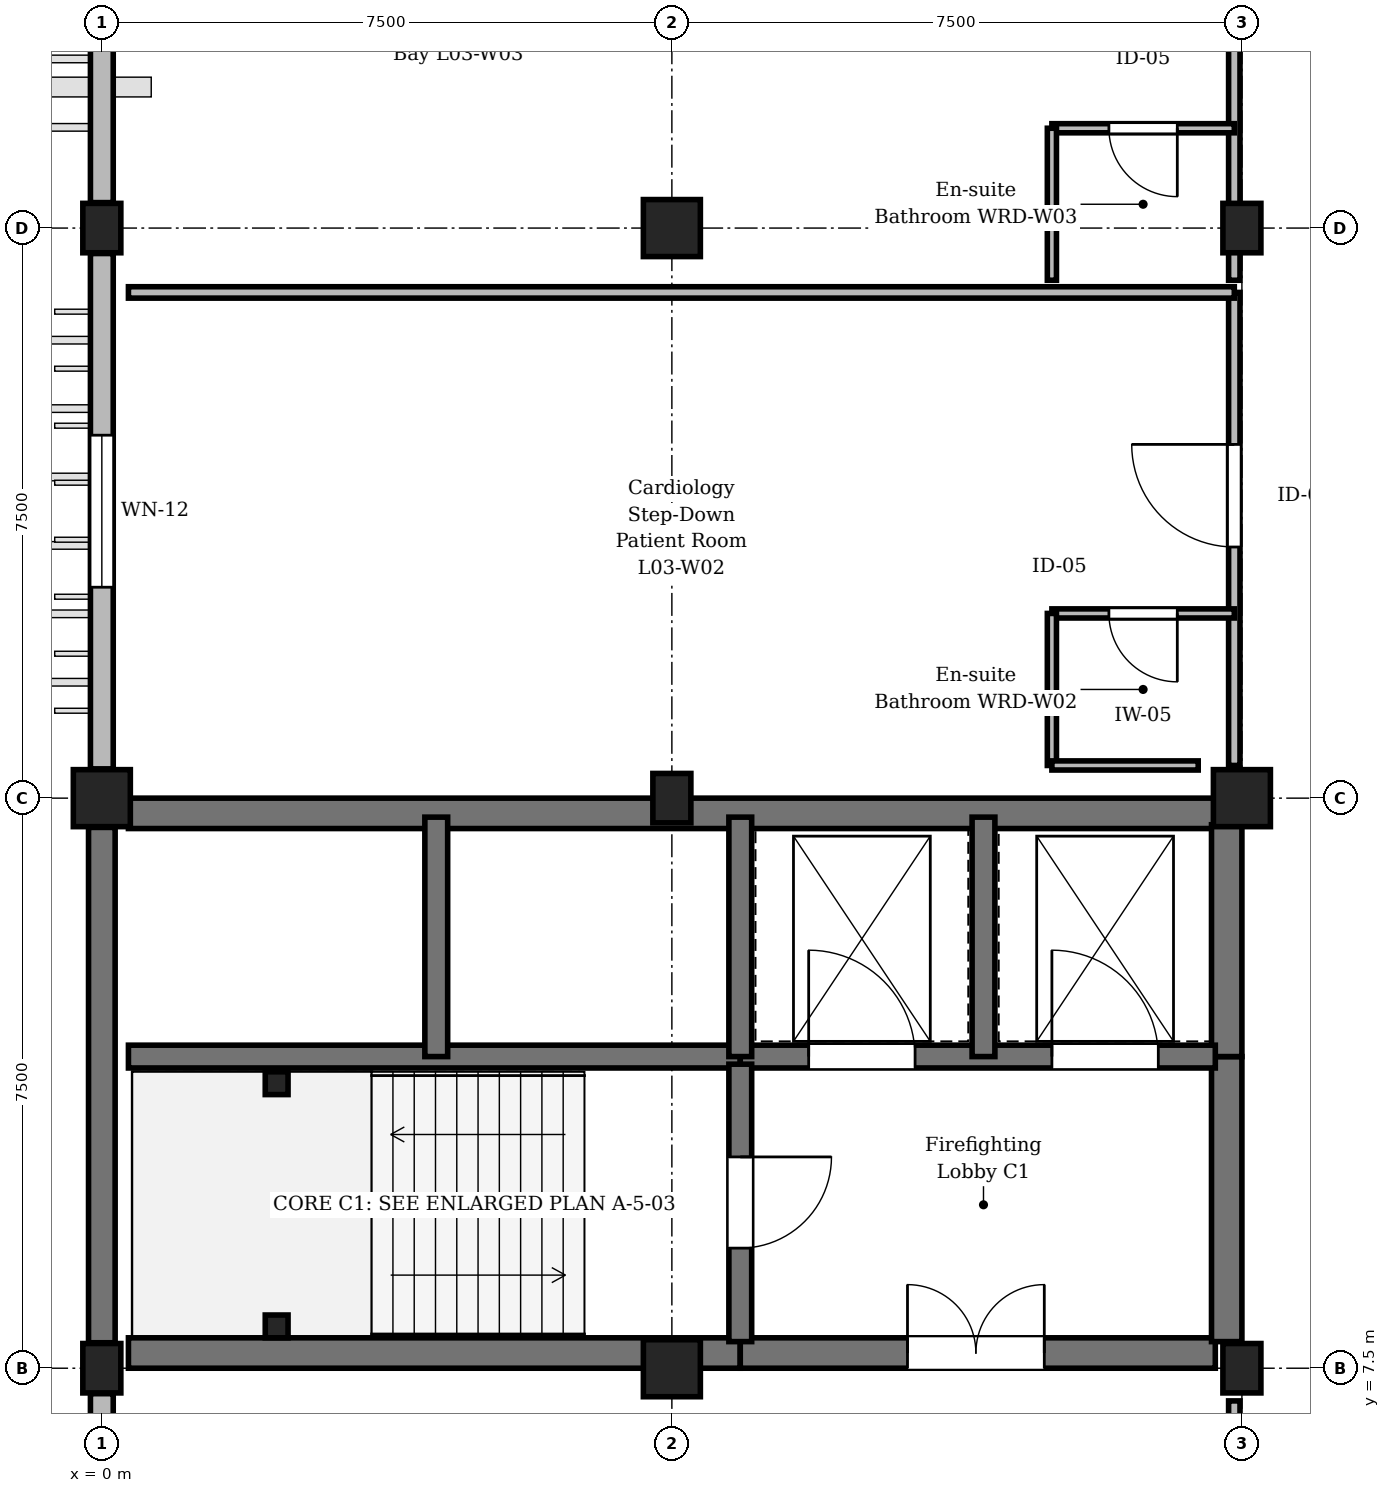
"""IFC4 building model, lengths in metres.
Left out: names, types, materials, properties, quantities, classifications, styles, units other than length and angle.
Written with IfcOpenShell. Run it as: python <this file> out.ifc"""

import sys

from ifc_helpers import new_model, si_unit, direction, frame, frame_2d, origin, origin_2d, place, context, subcontext, project, spatial, rectangle, i_section, extrude, element, fill, save


model = new_model("IFC4")
c1 = context("Model", 3, precision=1e-05, world=origin(), true_north=direction((0.0, 1.0)))
c2 = subcontext(c1, "Body", "Model", "MODEL_VIEW")
j1 = project(units=[si_unit("LENGTHUNIT", "METRE"), si_unit("PLANEANGLEUNIT", "RADIAN")], contexts=[c1])
p1 = place(None, origin())
s1 = spatial("IfcSite", under=j1, at=p1, CompositionType="ELEMENT")
p2 = place(p1, origin())
s2 = spatial("IfcBuilding", under=s1, at=p2, CompositionType="ELEMENT")
p3 = place(p2, frame((0.0, 0.0, 14.1)))
s3 = spatial("IfcBuildingStorey", under=s2, at=p3, CompositionType="ELEMENT", Elevation=14.1)
p4 = place(p3, frame((0.0, 7.5, 0.0), z_axis=(0.0, 0.0, 1.0), x_axis=(1.0, 0.0, 0.0)))
e1 = element("IfcColumn", 1, at=p4, inside=s3, PredefinedType="COLUMN", context=c2, shape_type="SweptSolid", body=[
    extrude(rectangle(XDim=0.5, YDim=0.65, at=origin_2d()), origin(), (0.0, 0.0, 1.0), 3.75),
])
p5 = place(p3, frame((0.0, 15.0, 0.0), z_axis=(0.0, 0.0, 1.0), x_axis=(1.0, 0.0, 0.0)))
e2 = element("IfcColumn", 2, at=p5, inside=s3, PredefinedType="COLUMN", context=c2, shape_type="SweptSolid", body=[
    extrude(rectangle(XDim=0.75, YDim=0.75, at=origin_2d()), origin(), (0.0, 0.0, 1.0), 3.75),
])
p6 = place(p3, frame((0.0, 22.5, 0.0), z_axis=(0.0, 0.0, 1.0), x_axis=(1.0, 0.0, 0.0)))
e3 = element("IfcColumn", 3, at=p6, inside=s3, PredefinedType="COLUMN", context=c2, shape_type="SweptSolid", body=[
    extrude(rectangle(XDim=0.5, YDim=0.65, at=origin_2d()), origin(), (0.0, 0.0, 1.0), 3.75),
])
p7 = place(p3, frame((7.5, 7.5, 0.0), z_axis=(0.0, 0.0, 1.0), x_axis=(1.0, 0.0, 0.0)))
e4 = element("IfcColumn", 4, at=p7, inside=s3, PredefinedType="COLUMN", context=c2, shape_type="SweptSolid", body=[
    extrude(rectangle(XDim=0.75, YDim=0.75, at=origin_2d()), origin(), (0.0, 0.0, 1.0), 3.75),
])
p8 = place(p3, frame((7.5, 15.0, 0.0), z_axis=(0.0, 0.0, 1.0), x_axis=(1.0, 0.0, 0.0)))
e5 = element("IfcColumn", 5, at=p8, inside=s3, PredefinedType="COLUMN", context=c2, shape_type="SweptSolid", body=[
    extrude(rectangle(XDim=0.5, YDim=0.65, at=origin_2d()), origin(), (0.0, 0.0, 1.0), 3.75),
])
p9 = place(p3, frame((7.5, 22.5, 0.0), z_axis=(0.0, 0.0, 1.0), x_axis=(1.0, 0.0, 0.0)))
e6 = element("IfcColumn", 6, at=p9, inside=s3, PredefinedType="COLUMN", context=c2, shape_type="SweptSolid", body=[
    extrude(rectangle(XDim=0.75, YDim=0.75, at=origin_2d()), origin(), (0.0, 0.0, 1.0), 3.75),
])
p10 = place(p3, frame((15.0, 7.5, 0.0), z_axis=(0.0, 0.0, 1.0), x_axis=(1.0, 0.0, 0.0)))
e7 = element("IfcColumn", 7, at=p10, inside=s3, PredefinedType="COLUMN", context=c2, shape_type="SweptSolid", body=[
    extrude(rectangle(XDim=0.5, YDim=0.65, at=origin_2d()), origin(), (0.0, 0.0, 1.0), 3.75),
])
p11 = place(p3, frame((15.0, 15.0, 0.0), z_axis=(0.0, 0.0, 1.0), x_axis=(1.0, 0.0, 0.0)))
e8 = element("IfcColumn", 8, at=p11, inside=s3, PredefinedType="COLUMN", context=c2, shape_type="SweptSolid", body=[
    extrude(rectangle(XDim=0.75, YDim=0.75, at=origin_2d()), origin(), (0.0, 0.0, 1.0), 3.75),
])
p12 = place(p3, frame((15.0, 22.5, 0.0), z_axis=(0.0, 0.0, 1.0), x_axis=(1.0, 0.0, 0.0)))
e9 = element("IfcColumn", 9, at=p12, inside=s3, PredefinedType="COLUMN", context=c2, shape_type="SweptSolid", body=[
    extrude(rectangle(XDim=0.5, YDim=0.65, at=origin_2d()), origin(), (0.0, 0.0, 1.0), 3.75),
])
for number, where, z_axis, x_axis in (
    (10, (2.3, 8.05, 0.0), (0.0, 0.0, 1.0), (1.0, 0.0, 0.0)),
    (11, (2.3, 11.25, 0.0), (0.0, 0.0, 1.0), (1.0, 0.0, 0.0)),
):
    element("IfcColumn", number, at=place(p3, frame(where, z_axis=z_axis, x_axis=x_axis)), inside=s3, PredefinedType="COLUMN", context=c2, shape_type="SweptSolid", body=[
        extrude(i_section(OverallWidth=0.3, OverallDepth=0.3, WebThickness=0.011, FlangeThickness=0.019, FilletRadius=0.027, at=origin_2d()), origin(), (0.0, 0.0, 1.0), 3.75),
    ])
p13 = place(p3, frame((0.0, 0.36, 0.0), z_axis=(0.0, 0.0, 1.0), x_axis=(0.0, 1.0, 0.0)))
e12 = element("IfcWall", 12, at=p13, inside=s3, PredefinedType="STANDARD", context=c2, shape_type="SweptSolid", body=[
    extrude(rectangle(XDim=6.805, YDim=0.3, at=frame_2d((3.402, 0.0))), origin(), (0.0, 0.0, 1.0), 2.87),
])
p14 = place(p13, frame((2.603, 0.0, 0.9)))
e13 = element("IfcOpeningElement", 13, at=p14, cuts=e12, PredefinedType="OPENING", context=c2, shape_type="SweptSolid", body=[
    extrude(rectangle(XDim=1.6, YDim=1.69, at=frame_2d((0.8, 0.845))), frame((0.0, 0.16, 0.0), z_axis=(0.0, -1.0, 0.0), x_axis=(1.0, 0.0, 0.0)), (0.0, 0.0, 1.0), 0.32),
])
p15 = place(p3, frame((0.0, 7.835, 0.0), z_axis=(0.0, 0.0, 1.0), x_axis=(0.0, 1.0, 0.0)))
e14 = element("IfcWall", 14, at=p15, inside=s3, PredefinedType="SHEAR", context=c2, shape_type="SweptSolid", body=[
    extrude(rectangle(XDim=6.78, YDim=0.35, at=frame_2d((3.39, 0.0))), origin(), (0.0, 0.0, 1.0), 3.47),
])
p16 = place(p3, frame((0.0, 15.385, 0.0), z_axis=(0.0, 0.0, 1.0), x_axis=(0.0, 1.0, 0.0)))
e15 = element("IfcWall", 15, at=p16, inside=s3, PredefinedType="STANDARD", context=c2, shape_type="SweptSolid", body=[
    extrude(rectangle(XDim=6.78, YDim=0.3, at=frame_2d((3.39, 0.0))), origin(), (0.0, 0.0, 1.0), 2.87),
])
p17 = place(p16, frame((2.39, 0.0, 0.9)))
e16 = element("IfcOpeningElement", 16, at=p17, cuts=e15, PredefinedType="OPENING", context=c2, shape_type="SweptSolid", body=[
    extrude(rectangle(XDim=2.0, YDim=1.69, at=frame_2d((1.0, 0.845))), frame((0.0, 0.16, 0.0), z_axis=(0.0, -1.0, 0.0), x_axis=(1.0, 0.0, 0.0)), (0.0, 0.0, 1.0), 0.32),
])
p18 = place(p3, frame((0.0, 22.835, 0.0), z_axis=(0.0, 0.0, 1.0), x_axis=(0.0, 1.0, 0.0)))
e17 = element("IfcWall", 17, at=p18, inside=s3, PredefinedType="STANDARD", context=c2, shape_type="SweptSolid", body=[
    extrude(rectangle(XDim=8.28, YDim=0.3, at=frame_2d((4.14, 0.0))), origin(), (0.0, 0.0, 1.0), 2.92),
])
p19 = place(p18, frame((3.04, 0.0, 0.9)))
e18 = element("IfcOpeningElement", 18, at=p19, cuts=e17, PredefinedType="OPENING", context=c2, shape_type="SweptSolid", body=[
    extrude(rectangle(XDim=2.2, YDim=1.74, at=frame_2d((1.1, 0.87))), frame((0.0, 0.16, 0.0), z_axis=(0.0, -1.0, 0.0), x_axis=(1.0, 0.0, 0.0)), (0.0, 0.0, 1.0), 0.32),
])
p20 = place(p3, frame((0.35, 7.7, 0.0), z_axis=(0.0, 0.0, 1.0), x_axis=(1.0, 0.0, 0.0)))
e19 = element("IfcWall", 19, at=p20, inside=s3, PredefinedType="SHEAR", context=c2, shape_type="SweptSolid", body=[
    extrude(rectangle(XDim=8.05, YDim=0.4, at=frame_2d((4.025, 0.0))), origin(), (0.0, 0.0, 1.0), 3.47),
])
p21 = place(p3, frame((8.4, 7.7, 0.0), z_axis=(0.0, 0.0, 1.0), x_axis=(1.0, 0.0, 0.0)))
e20 = element("IfcWall", 20, at=p21, inside=s3, PredefinedType="SHEAR", context=c2, shape_type="SweptSolid", body=[
    extrude(rectangle(XDim=6.25, YDim=0.4, at=frame_2d((3.125, 0.0))), origin(), (0.0, 0.0, 1.0), 3.47),
])
p22 = place(p21, frame((2.2, 0.0, 0.0)))
e21 = element("IfcOpeningElement", 21, at=p22, cuts=e20, PredefinedType="OPENING", context=c2, shape_type="SweptSolid", body=[
    extrude(rectangle(XDim=1.8, YDim=2.25, at=frame_2d((0.9, 1.125))), frame((0.0, 0.21, 0.0), z_axis=(0.0, -1.0, 0.0), x_axis=(1.0, 0.0, 0.0)), (0.0, 0.0, 1.0), 0.42),
])
p23 = place(p3, frame((0.35, 14.8, 0.0), z_axis=(0.0, 0.0, 1.0), x_axis=(1.0, 0.0, 0.0)))
e22 = element("IfcWall", 22, at=p23, inside=s3, PredefinedType="SHEAR", context=c2, shape_type="SweptSolid", body=[
    extrude(rectangle(XDim=14.3, YDim=0.4, at=frame_2d((7.15, 0.0))), origin(), (0.0, 0.0, 1.0), 3.47),
])
p24 = place(p3, frame((14.8, 7.85, 0.0), z_axis=(0.0, 0.0, 1.0), x_axis=(0.0, 1.0, 0.0)))
e23 = element("IfcWall", 23, at=p24, inside=s3, PredefinedType="SHEAR", context=c2, shape_type="SweptSolid", body=[
    extrude(rectangle(XDim=3.75, YDim=0.4, at=frame_2d((1.875, 0.0))), origin(), (0.0, 0.0, 1.0), 3.47),
])
p25 = place(p3, frame((14.8, 11.6, 0.0), z_axis=(0.0, 0.0, 1.0), x_axis=(0.0, 1.0, 0.0)))
e24 = element("IfcWall", 24, at=p25, inside=s3, PredefinedType="SHEAR", context=c2, shape_type="SweptSolid", body=[
    extrude(rectangle(XDim=3.05, YDim=0.4, at=frame_2d((1.525, 0.0))), origin(), (0.0, 0.0, 1.0), 3.47),
])
p26 = place(p3, frame((0.35, 11.6, 0.0), z_axis=(0.0, 0.0, 1.0), x_axis=(1.0, 0.0, 0.0)))
e25 = element("IfcWall", 25, at=p26, inside=s3, PredefinedType="SHEAR", context=c2, shape_type="SweptSolid", body=[
    extrude(rectangle(XDim=8.05, YDim=0.3, at=frame_2d((4.025, 0.0))), origin(), (0.0, 0.0, 1.0), 3.47),
])
p27 = place(p3, frame((8.4, 11.6, 0.0), z_axis=(0.0, 0.0, 1.0), x_axis=(1.0, 0.0, 0.0)))
e26 = element("IfcWall", 26, at=p27, inside=s3, PredefinedType="SHEAR", context=c2, shape_type="SweptSolid", body=[
    extrude(rectangle(XDim=6.25, YDim=0.3, at=frame_2d((3.125, 0.0))), origin(), (0.0, 0.0, 1.0), 3.47),
])
p28 = place(p27, frame((0.9, 0.0, 0.0)))
e27 = element("IfcOpeningElement", 27, at=p28, cuts=e26, PredefinedType="OPENING", context=c2, shape_type="SweptSolid", body=[
    extrude(rectangle(XDim=1.4, YDim=2.25, at=frame_2d((0.7, 1.125))), frame((0.0, 0.16, 0.0), z_axis=(0.0, -1.0, 0.0), x_axis=(1.0, 0.0, 0.0)), (0.0, 0.0, 1.0), 0.32),
])
p29 = place(p27, frame((4.1, 0.0, 0.0)))
e28 = element("IfcOpeningElement", 28, at=p29, cuts=e26, PredefinedType="OPENING", context=c2, shape_type="SweptSolid", body=[
    extrude(rectangle(XDim=1.4, YDim=2.25, at=frame_2d((0.7, 1.125))), frame((0.0, 0.16, 0.0), z_axis=(0.0, -1.0, 0.0), x_axis=(1.0, 0.0, 0.0)), (0.0, 0.0, 1.0), 0.32),
])
p30 = place(p3, frame((8.4, 11.5, 0.0), z_axis=(0.0, 0.0, 1.0), x_axis=(0.0, -1.0, 0.0)))
e29 = element("IfcWall", 29, at=p30, inside=s3, PredefinedType="SHEAR", context=c2, shape_type="SweptSolid", body=[
    extrude(rectangle(XDim=3.65, YDim=0.3, at=frame_2d((1.825, 0.0))), origin(), (0.0, 0.0, 1.0), 3.47),
])
p31 = place(p30, frame((1.22, 0.0, 0.0)))
e30 = element("IfcOpeningElement", 30, at=p31, cuts=e29, PredefinedType="OPENING", context=c2, shape_type="SweptSolid", body=[
    extrude(rectangle(XDim=1.2, YDim=2.25, at=frame_2d((0.6, 1.125))), frame((0.0, 0.16, 0.0), z_axis=(0.0, -1.0, 0.0), x_axis=(1.0, 0.0, 0.0)), (0.0, 0.0, 1.0), 0.32),
])
for number, where, z_axis, x_axis in (
    (31, (4.4, 11.6, 0.0), (0.0, 0.0, 1.0), (0.0, 1.0, 0.0)),
    (32, (8.4, 11.6, 0.0), (0.0, 0.0, 1.0), (0.0, 1.0, 0.0)),
    (33, (11.6, 11.6, 0.0), (0.0, 0.0, 1.0), (0.0, 1.0, 0.0)),
):
    element("IfcWall", number, at=place(p3, frame(where, z_axis=z_axis, x_axis=x_axis)), inside=s3, PredefinedType="SHEAR", context=c2, shape_type="SweptSolid", body=[
        extrude(rectangle(XDim=3.15, YDim=0.3, at=frame_2d((1.575, 0.0))), origin(), (0.0, 0.0, 1.0), 3.47),
    ])
p32 = place(p3, frame((14.9, 2.68, 0.0), z_axis=(0.0, 0.0, 1.0), x_axis=(0.0, 1.0, 0.0)))
e34 = element("IfcWall", 34, at=p32, inside=s3, PredefinedType="PARTITIONING", context=c2, shape_type="SweptSolid", body=[
    extrude(rectangle(XDim=4.39, YDim=0.15, at=frame_2d((2.195, 0.0))), origin(), (0.0, 0.0, 1.0), 2.905),
])
p33 = place(p32, frame((0.504, 0.0, 0.0)))
e35 = element("IfcOpeningElement", 35, at=p33, cuts=e34, PredefinedType="OPENING", context=c2, shape_type="SweptSolid", body=[
    extrude(rectangle(XDim=1.35, YDim=2.25, at=frame_2d((0.675, 1.125))), frame((0.0, 0.085, 0.0), z_axis=(0.0, -1.0, 0.0), x_axis=(1.0, 0.0, 0.0)), (0.0, 0.0, 1.0), 0.17),
])
p34 = place(p3, frame((14.9, 15.43, 0.0), z_axis=(0.0, 0.0, 1.0), x_axis=(0.0, 1.0, 0.0)))
e36 = element("IfcWall", 36, at=p34, inside=s3, PredefinedType="PARTITIONING", context=c2, shape_type="SweptSolid", body=[
    extrude(rectangle(XDim=6.223, YDim=0.15, at=frame_2d((3.112, 0.0))), origin(), (0.0, 0.0, 1.0), 2.905),
])
p35 = place(p34, frame((2.874, 0.0, 0.0)))
e37 = element("IfcOpeningElement", 37, at=p35, cuts=e36, PredefinedType="OPENING", context=c2, shape_type="SweptSolid", body=[
    extrude(rectangle(XDim=1.35, YDim=2.25, at=frame_2d((0.675, 1.125))), frame((0.0, 0.085, 0.0), z_axis=(0.0, -1.0, 0.0), x_axis=(1.0, 0.0, 0.0)), (0.0, 0.0, 1.0), 0.17),
])
p36 = place(p3, frame((14.9, 17.43, 0.0), z_axis=(0.0, 0.0, 1.0), x_axis=(-1.0, 0.0, 0.0)))
e38 = element("IfcWall", 38, at=p36, inside=s3, PredefinedType="PARTITIONING", context=c2, shape_type="SweptSolid", body=[
    extrude(rectangle(XDim=2.4, YDim=0.12, at=frame_2d((1.2, 0.0))), origin(), (0.0, 0.0, 1.0), 3.455),
])
p37 = place(p36, frame((0.75, 0.0, 0.0)))
e39 = element("IfcOpeningElement", 39, at=p37, cuts=e38, PredefinedType="OPENING", context=c2, shape_type="SweptSolid", body=[
    extrude(rectangle(XDim=0.9, YDim=2.1, at=frame_2d((0.45, 1.05))), frame((0.0, 0.07, 0.0), z_axis=(0.0, -1.0, 0.0), x_axis=(1.0, 0.0, 0.0)), (0.0, 0.0, 1.0), 0.14),
])
p38 = place(p3, frame((12.5, 15.43, 0.0), z_axis=(0.0, 0.0, 1.0), x_axis=(0.0, 1.0, 0.0)))
e40 = element("IfcWall", 40, at=p38, inside=s3, PredefinedType="PARTITIONING", context=c2, shape_type="SweptSolid", body=[
    extrude(rectangle(XDim=2.0, YDim=0.12, at=frame_2d((1.0, 0.0))), origin(), (0.0, 0.0, 1.0), 3.455),
])
p39 = place(p3, frame((14.9, 21.813, 0.0), z_axis=(0.0, 0.0, 1.0), x_axis=(0.0, 1.0, 0.0)))
e41 = element("IfcWall", 41, at=p39, inside=s3, PredefinedType="PARTITIONING", context=c2, shape_type="SweptSolid", body=[
    extrude(rectangle(XDim=6.223, YDim=0.15, at=frame_2d((3.112, 0.0))), origin(), (0.0, 0.0, 1.0), 2.755),
])
p40 = place(p39, frame((4.623, 0.0, 0.0)))
e42 = element("IfcOpeningElement", 42, at=p40, cuts=e41, PredefinedType="OPENING", context=c2, shape_type="SweptSolid", body=[
    extrude(rectangle(XDim=1.35, YDim=2.25, at=frame_2d((0.675, 1.125))), frame((0.0, 0.085, 0.0), z_axis=(0.0, -1.0, 0.0), x_axis=(1.0, 0.0, 0.0)), (0.0, 0.0, 1.0), 0.17),
])
p41 = place(p3, frame((14.9, 23.813, 0.0), z_axis=(0.0, 0.0, 1.0), x_axis=(-1.0, 0.0, 0.0)))
e43 = element("IfcWall", 43, at=p41, inside=s3, PredefinedType="PARTITIONING", context=c2, shape_type="SweptSolid", body=[
    extrude(rectangle(XDim=2.4, YDim=0.12, at=frame_2d((1.2, 0.0))), origin(), (0.0, 0.0, 1.0), 3.455),
])
p42 = place(p41, frame((0.75, 0.0, 0.0)))
e44 = element("IfcOpeningElement", 44, at=p42, cuts=e43, PredefinedType="OPENING", context=c2, shape_type="SweptSolid", body=[
    extrude(rectangle(XDim=0.9, YDim=2.1, at=frame_2d((0.45, 1.05))), frame((0.0, 0.07, 0.0), z_axis=(0.0, -1.0, 0.0), x_axis=(1.0, 0.0, 0.0)), (0.0, 0.0, 1.0), 0.14),
])
p43 = place(p3, frame((12.5, 21.813, 0.0), z_axis=(0.0, 0.0, 1.0), x_axis=(0.0, 1.0, 0.0)))
e45 = element("IfcWall", 45, at=p43, inside=s3, PredefinedType="PARTITIONING", context=c2, shape_type="SweptSolid", body=[
    extrude(rectangle(XDim=2.0, YDim=0.12, at=frame_2d((1.0, 0.0))), origin(), (0.0, 0.0, 1.0), 3.455),
])
p44 = place(p3, frame((0.35, 21.653, 0.0), z_axis=(0.0, 0.0, 1.0), x_axis=(1.0, 0.0, 0.0)))
e46 = element("IfcWall", 46, at=p44, inside=s3, PredefinedType="PARTITIONING", context=c2, shape_type="SweptSolid", body=[
    extrude(rectangle(XDim=14.55, YDim=0.15, at=frame_2d((7.275, 0.0))), origin(), (0.0, 0.0, 1.0), 3.455),
])
p45 = place(p3, frame((12.5, 15.43, 0.0), z_axis=(0.0, 0.0, 1.0), x_axis=(1.0, 0.0, 0.0)))
e47 = element("IfcWall", 47, at=p45, inside=s3, PredefinedType="PARTITIONING", context=c2, shape_type="SweptSolid", body=[
    extrude(rectangle(XDim=1.925, YDim=0.12, at=frame_2d((0.962, 0.0))), origin(), (0.0, 0.0, 1.0), 3.455),
])
p46 = place(p17, origin())
e48 = element("IfcWindow", 48, at=p46, inside=s3, PartitioningType="SINGLE_PANEL", PredefinedType="WINDOW", context=c2, shape_type="SweptSolid", body=[
    extrude(rectangle(XDim=2.0, YDim=1.69, at=frame_2d((1.0, 0.845))), frame((0.0, 0.03, 0.0), z_axis=(0.0, -1.0, 0.0), x_axis=(1.0, 0.0, 0.0)), (0.0, 0.0, 1.0), 0.06),
])
fill(e16, e48)
p47 = place(p22, origin())
e49 = element("IfcDoor", 49, at=p47, inside=s3, OperationType="DOUBLE_DOOR_SINGLE_SWING", PredefinedType="DOOR", context=c2, shape_type="SweptSolid", body=[
    extrude(rectangle(XDim=1.8, YDim=2.25, at=frame_2d((0.9, 1.125))), frame((0.0, 0.025, 0.0), z_axis=(0.0, -1.0, 0.0), x_axis=(1.0, 0.0, 0.0)), (0.0, 0.0, 1.0), 0.05),
])
fill(e21, e49)
p48 = place(p28, origin())
e50 = element("IfcDoor", 50, at=p48, inside=s3, OperationType="DOUBLE_DOOR_SLIDING", PredefinedType="DOOR", context=c2, shape_type="SweptSolid", body=[
    extrude(rectangle(XDim=1.4, YDim=2.25, at=frame_2d((0.7, 1.125))), frame((0.0, 0.025, 0.0), z_axis=(0.0, -1.0, 0.0), x_axis=(1.0, 0.0, 0.0)), (0.0, 0.0, 1.0), 0.05),
])
fill(e27, e50)
p49 = place(p29, origin())
e51 = element("IfcDoor", 51, at=p49, inside=s3, OperationType="DOUBLE_DOOR_SLIDING", PredefinedType="DOOR", context=c2, shape_type="SweptSolid", body=[
    extrude(rectangle(XDim=1.4, YDim=2.25, at=frame_2d((0.7, 1.125))), frame((0.0, 0.025, 0.0), z_axis=(0.0, -1.0, 0.0), x_axis=(1.0, 0.0, 0.0)), (0.0, 0.0, 1.0), 0.05),
])
fill(e28, e51)
p50 = place(p31, origin())
e52 = element("IfcDoor", 52, at=p50, inside=s3, OperationType="SINGLE_SWING_LEFT", PredefinedType="DOOR", context=c2, shape_type="SweptSolid", body=[
    extrude(rectangle(XDim=1.2, YDim=2.25, at=frame_2d((0.6, 1.125))), frame((0.0, 0.025, 0.0), z_axis=(0.0, -1.0, 0.0), x_axis=(1.0, 0.0, 0.0)), (0.0, 0.0, 1.0), 0.05),
])
fill(e30, e52)
p51 = place(p35, origin())
e53 = element("IfcDoor", 53, at=p51, inside=s3, OperationType="SINGLE_SWING_RIGHT", PredefinedType="DOOR", context=c2, shape_type="SweptSolid", body=[
    extrude(rectangle(XDim=1.35, YDim=2.25, at=frame_2d((0.675, 1.125))), frame((0.0, 0.025, 0.0), z_axis=(0.0, -1.0, 0.0), x_axis=(1.0, 0.0, 0.0)), (0.0, 0.0, 1.0), 0.05),
])
fill(e37, e53)
p52 = place(p37, origin())
e54 = element("IfcDoor", 54, at=p52, inside=s3, OperationType="SINGLE_SWING_LEFT", PredefinedType="DOOR", context=c2, shape_type="SweptSolid", body=[
    extrude(rectangle(XDim=0.9, YDim=2.1, at=frame_2d((0.45, 1.05))), frame((0.0, 0.025, 0.0), z_axis=(0.0, -1.0, 0.0), x_axis=(1.0, 0.0, 0.0)), (0.0, 0.0, 1.0), 0.05),
])
fill(e39, e54)
p53 = place(p42, origin())
e55 = element("IfcDoor", 55, at=p53, inside=s3, OperationType="SINGLE_SWING_LEFT", PredefinedType="DOOR", context=c2, shape_type="SweptSolid", body=[
    extrude(rectangle(XDim=0.9, YDim=2.1, at=frame_2d((0.45, 1.05))), frame((0.0, 0.025, 0.0), z_axis=(0.0, -1.0, 0.0), x_axis=(1.0, 0.0, 0.0)), (0.0, 0.0, 1.0), 0.05),
])
fill(e44, e55)
save(model, sys.argv[1])
